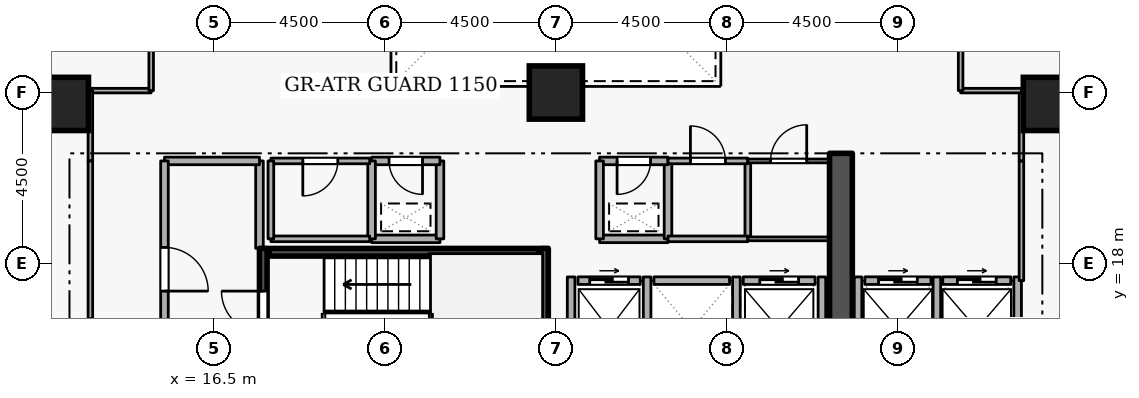
"""IFC4 building model, lengths in metres.
Left out: names, types, materials, properties, quantities, classifications, styles, units other than length and angle.
Written with IfcOpenShell. Run it as: python <this file> out.ifc"""

import sys

from ifc_helpers import new_model, si_unit, direction, frame, frame_2d, origin, origin_2d, place, context, subcontext, project, spatial, rectangle, extrude, element, fill, save


model = new_model("IFC4")
c1 = context("Model", 3, precision=1e-05, world=origin(), true_north=direction((0.0, 1.0)))
c2 = subcontext(c1, "Body", "Model", "MODEL_VIEW")
j1 = project(units=[si_unit("LENGTHUNIT", "METRE"), si_unit("PLANEANGLEUNIT", "RADIAN")], contexts=[c1])
p1 = place(None, origin())
s1 = spatial("IfcSite", under=j1, at=p1, CompositionType="ELEMENT")
p2 = place(p1, origin())
s2 = spatial("IfcBuilding", under=s1, at=p2, CompositionType="ELEMENT")
p3 = place(p2, frame((0.0, 0.0, 35.1)))
s3 = spatial("IfcBuildingStorey", under=s2, at=p3, CompositionType="ELEMENT", Elevation=35.1)
p4 = place(p3, frame((33.0, 15.2, 0.0), z_axis=(0.0, 0.0, 1.0), x_axis=(0.0, 1.0, 0.0)))
e1 = element("IfcWall", 1, at=p4, inside=s3, PredefinedType="SHEAR", context=c2, shape_type="SweptSolid", body=[
    extrude(rectangle(XDim=5.7, YDim=0.6, at=frame_2d((2.85, 0.0))), origin(), (0.0, 0.0, 1.0), 3.6),
])
for number, where, z_axis, x_axis in (
    (2, (12.5, 22.2, 0.0), (0.0, 0.0, 1.0), (1.0, 0.0, 0.0)),
    (3, (38.5, 22.2, 0.0), (0.0, 0.0, 1.0), (1.0, 0.0, 0.0)),
    (4, (25.5, 22.5, 0.0), (0.0, 0.0, 1.0), (1.0, 0.0, 0.0)),
):
    element("IfcColumn", number, at=place(p3, frame(where, z_axis=z_axis, x_axis=x_axis)), inside=s3, PredefinedType="COLUMN", context=c2, shape_type="SweptSolid", body=[
        extrude(rectangle(XDim=1.4, YDim=1.4, at=origin_2d()), origin(), (0.0, 0.0, 1.0), 3.6),
    ])
p5 = place(p3, frame((26.08, 17.55, 0.0), z_axis=(0.0, 0.0, 1.0), x_axis=(1.0, 0.0, 0.0)))
e5 = element("IfcWall", 5, at=p5, inside=s3, PredefinedType="STANDARD", context=c2, shape_type="SweptSolid", body=[
    extrude(rectangle(XDim=1.64, YDim=0.2, at=frame_2d((0.82, 0.0))), origin(), (0.0, 0.0, 1.0), 3.34),
])
p6 = place(p5, frame((0.31, 0.0, 0.0)))
e6 = element("IfcOpeningElement", 6, at=p6, cuts=e5, PredefinedType="OPENING", context=c2, shape_type="SweptSolid", body=[
    extrude(rectangle(XDim=1.02, YDim=2.06, at=frame_2d((0.51, 1.03))), frame((0.0, 0.11, 0.0), z_axis=(0.0, -1.0, 0.0), x_axis=(1.0, 0.0, 0.0)), (0.0, 0.0, 1.0), 0.22),
])
p7 = place(p3, frame((28.08, 17.55, 0.0), z_axis=(0.0, 0.0, 1.0), x_axis=(1.0, 0.0, 0.0)))
e7 = element("IfcWall", 7, at=p7, inside=s3, PredefinedType="STANDARD", context=c2, shape_type="SweptSolid", body=[
    extrude(rectangle(XDim=1.99, YDim=0.2, at=frame_2d((0.995, 0.0))), origin(), (0.0, 0.0, 1.0), 3.34),
])
p8 = place(p3, frame((30.43, 17.55, 0.0), z_axis=(0.0, 0.0, 1.0), x_axis=(1.0, 0.0, 0.0)))
e8 = element("IfcWall", 8, at=p8, inside=s3, PredefinedType="STANDARD", context=c2, shape_type="SweptSolid", body=[
    extrude(rectangle(XDim=1.89, YDim=0.2, at=frame_2d((0.945, 0.0))), origin(), (0.0, 0.0, 1.0), 3.34),
])
p9 = place(p8, frame((0.435, 0.0, 0.0)))
e9 = element("IfcOpeningElement", 9, at=p9, cuts=e8, PredefinedType="OPENING", context=c2, shape_type="SweptSolid", body=[
    extrude(rectangle(XDim=1.02, YDim=2.06, at=frame_2d((0.51, 1.03))), frame((0.0, 0.11, 0.0), z_axis=(0.0, -1.0, 0.0), x_axis=(1.0, 0.0, 0.0)), (0.0, 0.0, 1.0), 0.22),
])
p10 = place(p3, frame((33.63, 17.55, 0.0), z_axis=(0.0, 0.0, 1.0), x_axis=(1.0, 0.0, 0.0)))
e10 = element("IfcWall", 10, at=p10, inside=s3, PredefinedType="STANDARD", context=c2, shape_type="SweptSolid", body=[
    extrude(rectangle(XDim=1.74, YDim=0.2, at=frame_2d((0.87, 0.0))), origin(), (0.0, 0.0, 1.0), 3.34),
])
p11 = place(p10, frame((0.36, 0.0, 0.0)))
e11 = element("IfcOpeningElement", 11, at=p11, cuts=e10, PredefinedType="OPENING", context=c2, shape_type="SweptSolid", body=[
    extrude(rectangle(XDim=1.02, YDim=2.06, at=frame_2d((0.51, 1.03))), frame((0.0, 0.11, 0.0), z_axis=(0.0, -1.0, 0.0), x_axis=(1.0, 0.0, 0.0)), (0.0, 0.0, 1.0), 0.22),
])
p12 = place(p3, frame((35.68, 17.55, 0.0), z_axis=(0.0, 0.0, 1.0), x_axis=(1.0, 0.0, 0.0)))
e12 = element("IfcWall", 12, at=p12, inside=s3, PredefinedType="STANDARD", context=c2, shape_type="SweptSolid", body=[
    extrude(rectangle(XDim=1.79, YDim=0.2, at=frame_2d((0.895, 0.0))), origin(), (0.0, 0.0, 1.0), 3.34),
])
p13 = place(p12, frame((0.385, 0.0, 0.0)))
e13 = element("IfcOpeningElement", 13, at=p13, cuts=e12, PredefinedType="OPENING", context=c2, shape_type="SweptSolid", body=[
    extrude(rectangle(XDim=1.02, YDim=2.06, at=frame_2d((0.51, 1.03))), frame((0.0, 0.11, 0.0), z_axis=(0.0, -1.0, 0.0), x_axis=(1.0, 0.0, 0.0)), (0.0, 0.0, 1.0), 0.22),
])
for number, where, z_axis, x_axis in (
    (14, (27.9, 15.212, 0.0), (0.0, 0.0, 1.0), (0.0, 1.0, 0.0)),
    (15, (25.9, 15.212, 0.0), (0.0, 0.0, 1.0), (0.0, 1.0, 0.0)),
    (16, (30.25, 15.212, 0.0), (0.0, 0.0, 1.0), (0.0, 1.0, 0.0)),
    (17, (32.5, 15.212, 0.0), (0.0, 0.0, 1.0), (0.0, 1.0, 0.0)),
):
    element("IfcWall", number, at=place(p3, frame(where, z_axis=z_axis, x_axis=x_axis)), inside=s3, PredefinedType="STANDARD", context=c2, shape_type="SweptSolid", body=[
        extrude(rectangle(XDim=2.436, YDim=0.2, at=frame_2d((1.218, 0.0))), origin(), (0.0, 0.0, 1.0), 3.34),
    ])
for number, where, z_axis, x_axis in (
    (18, (35.525, 15.012, 0.0), (0.0, 0.0, 1.0), (0.0, 1.0, 0.0)),
    (19, (33.45, 15.012, 0.0), (0.0, 0.0, 1.0), (0.0, 1.0, 0.0)),
    (20, (37.65, 15.012, 0.0), (0.0, 0.0, 1.0), (0.0, 1.0, 0.0)),
):
    element("IfcWall", number, at=place(p3, frame(where, z_axis=z_axis, x_axis=x_axis)), inside=s3, PredefinedType="STANDARD", context=c2, shape_type="SweptSolid", body=[
        extrude(rectangle(XDim=2.636, YDim=0.2, at=frame_2d((1.318, 0.0))), origin(), (0.0, 0.0, 1.0), 3.34),
    ])
p14 = place(p3, frame((17.8, 15.05, 0.0), z_axis=(0.0, 0.0, 1.0), x_axis=(0.0, 1.0, 0.0)))
e21 = element("IfcWall", 21, at=p14, inside=s3, PredefinedType="SHEAR", context=c2, shape_type="SweptSolid", body=[
    extrude(rectangle(XDim=3.35, YDim=0.2, at=frame_2d((1.675, 0.0))), origin(), (0.0, 0.0, 1.0), 3.6),
])
p15 = place(p14, frame((1.125, 0.0, 0.0)))
e22 = element("IfcOpeningElement", 22, at=p15, cuts=e21, PredefinedType="OPENING", context=c2, shape_type="SweptSolid", body=[
    extrude(rectangle(XDim=1.1, YDim=2.1, at=frame_2d((0.55, 1.05))), frame((0.0, 0.11, 0.0), z_axis=(0.0, -1.0, 0.0), x_axis=(1.0, 0.0, 0.0)), (0.0, 0.0, 1.0), 0.22),
])
p16 = place(p3, frame((25.2, 18.4, 0.0), z_axis=(0.0, 0.0, 1.0), x_axis=(0.0, -1.0, 0.0)))
e23 = element("IfcWall", 23, at=p16, inside=s3, PredefinedType="SHEAR", context=c2, shape_type="SweptSolid", body=[
    extrude(rectangle(XDim=3.35, YDim=0.2, at=frame_2d((1.675, 0.0))), origin(), (0.0, 0.0, 1.0), 3.6),
])
p17 = place(p3, frame((25.05, 18.297, 0.0), z_axis=(0.0, 0.0, 1.0), x_axis=(-1.0, 0.0, 0.0)))
e24 = element("IfcWall", 24, at=p17, inside=s3, PredefinedType="SHEAR", context=c2, shape_type="SweptSolid", body=[
    extrude(rectangle(XDim=7.1, YDim=0.2, at=frame_2d((3.55, 0.0))), origin(), (0.0, 0.0, 1.0), 3.6),
])
p18 = place(p3, frame((17.7, 18.4, 0.0), z_axis=(0.0, 0.0, 1.0), x_axis=(0.0, 1.0, 0.0)))
e25 = element("IfcWall", 25, at=p18, inside=s3, PredefinedType="STANDARD", context=c2, shape_type="SweptSolid", body=[
    extrude(rectangle(XDim=2.3, YDim=0.2, at=frame_2d((1.15, 0.0))), origin(), (0.0, 0.0, 1.0), 2.545),
])
p19 = place(p3, frame((17.7, 20.7, 0.0), z_axis=(0.0, 0.0, 1.0), x_axis=(-1.0, 0.0, 0.0)))
e26 = element("IfcWall", 26, at=p19, inside=s3, PredefinedType="STANDARD", context=c2, shape_type="SweptSolid", body=[
    extrude(rectangle(XDim=2.5, YDim=0.2, at=frame_2d((1.25, 0.0))), origin(), (0.0, 0.0, 1.0), 3.34),
])
p20 = place(p3, frame((15.2, 20.7, 0.0), z_axis=(0.0, 0.0, 1.0), x_axis=(0.0, -1.0, 0.0)))
e27 = element("IfcWall", 27, at=p20, inside=s3, PredefinedType="STANDARD", context=c2, shape_type="SweptSolid", body=[
    extrude(rectangle(XDim=5.7, YDim=0.2, at=frame_2d((2.85, 0.0))), origin(), (0.0, 0.0, 1.0), 3.34),
])
p21 = place(p20, frame((2.275, 0.0, 0.0)))
e28 = element("IfcOpeningElement", 28, at=p21, cuts=e27, PredefinedType="OPENING", context=c2, shape_type="SweptSolid", body=[
    extrude(rectangle(XDim=1.15, YDim=2.1, at=frame_2d((0.575, 1.05))), frame((0.0, 0.11, 0.0), z_axis=(0.0, -1.0, 0.0), x_axis=(1.0, 0.0, 0.0)), (0.0, 0.0, 1.0), 0.22),
])
p22 = place(p3, frame((26.65, 18.65, 0.0), z_axis=(0.0, 0.0, 1.0), x_axis=(1.0, 0.0, 0.0)))
e29 = element("IfcWall", 29, at=p22, inside=s3, PredefinedType="STANDARD", context=c2, shape_type="SweptSolid", body=[
    extrude(rectangle(XDim=1.8, YDim=0.2, at=frame_2d((0.9, 0.0))), origin(), (0.0, 0.0, 1.0), 3.34),
])
p23 = place(p3, frame((28.45, 18.65, 0.0), z_axis=(0.0, 0.0, 1.0), x_axis=(0.0, 1.0, 0.0)))
e30 = element("IfcWall", 30, at=p23, inside=s3, PredefinedType="STANDARD", context=c2, shape_type="SweptSolid", body=[
    extrude(rectangle(XDim=2.05, YDim=0.2, at=frame_2d((1.025, 0.0))), origin(), (0.0, 0.0, 1.0), 3.34),
])
p24 = place(p3, frame((28.45, 20.7, 0.0), z_axis=(0.0, 0.0, 1.0), x_axis=(-1.0, 0.0, 0.0)))
e31 = element("IfcWall", 31, at=p24, inside=s3, PredefinedType="STANDARD", context=c2, shape_type="SweptSolid", body=[
    extrude(rectangle(XDim=1.8, YDim=0.2, at=frame_2d((0.9, 0.0))), origin(), (0.0, 0.0, 1.0), 3.34),
])
p25 = place(p24, frame((0.46, 0.0, 0.0)))
e32 = element("IfcOpeningElement", 32, at=p25, cuts=e31, PredefinedType="OPENING", context=c2, shape_type="SweptSolid", body=[
    extrude(rectangle(XDim=0.88, YDim=2.04, at=frame_2d((0.44, 1.02))), frame((0.0, 0.11, 0.0), z_axis=(0.0, -1.0, 0.0), x_axis=(1.0, 0.0, 0.0)), (0.0, 0.0, 1.0), 0.22),
])
p26 = place(p3, frame((26.65, 20.7, 0.0), z_axis=(0.0, 0.0, 1.0), x_axis=(0.0, -1.0, 0.0)))
e33 = element("IfcWall", 33, at=p26, inside=s3, PredefinedType="STANDARD", context=c2, shape_type="SweptSolid", body=[
    extrude(rectangle(XDim=2.05, YDim=0.2, at=frame_2d((1.025, 0.0))), origin(), (0.0, 0.0, 1.0), 3.34),
])
p27 = place(p3, frame((20.65, 18.65, 0.0), z_axis=(0.0, 0.0, 1.0), x_axis=(1.0, 0.0, 0.0)))
e34 = element("IfcWall", 34, at=p27, inside=s3, PredefinedType="STANDARD", context=c2, shape_type="SweptSolid", body=[
    extrude(rectangle(XDim=1.8, YDim=0.2, at=frame_2d((0.9, 0.0))), origin(), (0.0, 0.0, 1.0), 3.34),
])
p28 = place(p3, frame((22.45, 18.65, 0.0), z_axis=(0.0, 0.0, 1.0), x_axis=(0.0, 1.0, 0.0)))
e35 = element("IfcWall", 35, at=p28, inside=s3, PredefinedType="STANDARD", context=c2, shape_type="SweptSolid", body=[
    extrude(rectangle(XDim=2.05, YDim=0.2, at=frame_2d((1.025, 0.0))), origin(), (0.0, 0.0, 1.0), 3.34),
])
p29 = place(p3, frame((22.45, 20.7, 0.0), z_axis=(0.0, 0.0, 1.0), x_axis=(-1.0, 0.0, 0.0)))
e36 = element("IfcWall", 36, at=p29, inside=s3, PredefinedType="STANDARD", context=c2, shape_type="SweptSolid", body=[
    extrude(rectangle(XDim=1.8, YDim=0.2, at=frame_2d((0.9, 0.0))), origin(), (0.0, 0.0, 1.0), 3.34),
])
p30 = place(p29, frame((0.46, 0.0, 0.0)))
e37 = element("IfcOpeningElement", 37, at=p30, cuts=e36, PredefinedType="OPENING", context=c2, shape_type="SweptSolid", body=[
    extrude(rectangle(XDim=0.88, YDim=2.04, at=frame_2d((0.44, 1.02))), frame((0.0, 0.11, 0.0), z_axis=(0.0, -1.0, 0.0), x_axis=(1.0, 0.0, 0.0)), (0.0, 0.0, 1.0), 0.22),
])
p31 = place(p3, frame((20.65, 20.7, 0.0), z_axis=(0.0, 0.0, 1.0), x_axis=(0.0, -1.0, 0.0)))
e38 = element("IfcWall", 38, at=p31, inside=s3, PredefinedType="STANDARD", context=c2, shape_type="SweptSolid", body=[
    extrude(rectangle(XDim=2.05, YDim=0.2, at=frame_2d((1.025, 0.0))), origin(), (0.0, 0.0, 1.0), 3.34),
])
p32 = place(p3, frame((18.0, 18.65, 0.0), z_axis=(0.0, 0.0, 1.0), x_axis=(1.0, 0.0, 0.0)))
e39 = element("IfcWall", 39, at=p32, inside=s3, PredefinedType="PARTITIONING", context=c2, shape_type="SweptSolid", body=[
    extrude(rectangle(XDim=2.6, YDim=0.15, at=frame_2d((1.3, 0.0))), origin(), (0.0, 0.0, 1.0), 3.34),
])
p33 = place(p3, frame((20.6, 20.7, 0.0), z_axis=(0.0, 0.0, 1.0), x_axis=(-1.0, 0.0, 0.0)))
e40 = element("IfcWall", 40, at=p33, inside=s3, PredefinedType="PARTITIONING", context=c2, shape_type="SweptSolid", body=[
    extrude(rectangle(XDim=2.6, YDim=0.15, at=frame_2d((1.3, 0.0))), origin(), (0.0, 0.0, 1.0), 3.34),
])
p34 = place(p33, frame((0.84, 0.0, 0.0)))
e41 = element("IfcOpeningElement", 41, at=p34, cuts=e40, PredefinedType="OPENING", context=c2, shape_type="SweptSolid", body=[
    extrude(rectangle(XDim=0.92, YDim=2.08, at=frame_2d((0.46, 1.04))), frame((0.0, 0.085, 0.0), z_axis=(0.0, -1.0, 0.0), x_axis=(1.0, 0.0, 0.0)), (0.0, 0.0, 1.0), 0.17),
])
p35 = place(p3, frame((18.0, 20.7, 0.0), z_axis=(0.0, 0.0, 1.0), x_axis=(0.0, -1.0, 0.0)))
e42 = element("IfcWall", 42, at=p35, inside=s3, PredefinedType="PARTITIONING", context=c2, shape_type="SweptSolid", body=[
    extrude(rectangle(XDim=2.05, YDim=0.15, at=frame_2d((1.025, 0.0))), origin(), (0.0, 0.0, 1.0), 2.545),
])
p36 = place(p3, frame((30.55, 20.7, 0.0), z_axis=(0.0, 0.0, 1.0), x_axis=(0.0, -1.0, 0.0)))
e43 = element("IfcWall", 43, at=p36, inside=s3, PredefinedType="PARTITIONING", context=c2, shape_type="SweptSolid", body=[
    extrude(rectangle(XDim=2.05, YDim=0.15, at=frame_2d((1.025, 0.0))), origin(), (0.0, 0.0, 1.0), 3.34),
])
p37 = place(p3, frame((30.55, 18.65, 0.0), z_axis=(0.0, 0.0, 1.0), x_axis=(-1.0, 0.0, 0.0)))
e44 = element("IfcWall", 44, at=p37, inside=s3, PredefinedType="PARTITIONING", context=c2, shape_type="SweptSolid", body=[
    extrude(rectangle(XDim=2.1, YDim=0.15, at=frame_2d((1.05, 0.0))), origin(), (0.0, 0.0, 1.0), 3.34),
])
p38 = place(p3, frame((28.45, 20.7, 0.0), z_axis=(0.0, 0.0, 1.0), x_axis=(1.0, 0.0, 0.0)))
e45 = element("IfcWall", 45, at=p38, inside=s3, PredefinedType="PARTITIONING", context=c2, shape_type="SweptSolid", body=[
    extrude(rectangle(XDim=2.1, YDim=0.15, at=frame_2d((1.05, 0.0))), origin(), (0.0, 0.0, 1.0), 3.34),
])
p39 = place(p38, frame((0.59, 0.0, 0.0)))
e46 = element("IfcOpeningElement", 46, at=p39, cuts=e45, PredefinedType="OPENING", context=c2, shape_type="SweptSolid", body=[
    extrude(rectangle(XDim=0.92, YDim=2.08, at=frame_2d((0.46, 1.04))), frame((0.0, 0.085, 0.0), z_axis=(0.0, -1.0, 0.0), x_axis=(1.0, 0.0, 0.0)), (0.0, 0.0, 1.0), 0.17),
])
p40 = place(p3, frame((32.7, 18.65, 0.0), z_axis=(0.0, 0.0, 1.0), x_axis=(-1.0, 0.0, 0.0)))
e47 = element("IfcWall", 47, at=p40, inside=s3, PredefinedType="PARTITIONING", context=c2, shape_type="SweptSolid", body=[
    extrude(rectangle(XDim=2.15, YDim=0.1, at=frame_2d((1.075, 0.0))), origin(), (0.0, 0.0, 1.0), 3.34),
])
p41 = place(p3, frame((30.55, 20.7, 0.0), z_axis=(0.0, 0.0, 1.0), x_axis=(1.0, 0.0, 0.0)))
e48 = element("IfcWall", 48, at=p41, inside=s3, PredefinedType="PARTITIONING", context=c2, shape_type="SweptSolid", body=[
    extrude(rectangle(XDim=2.15, YDim=0.1, at=frame_2d((1.075, 0.0))), origin(), (0.0, 0.0, 1.0), 3.34),
])
p42 = place(p41, frame((0.6, 0.0, 0.0)))
e49 = element("IfcOpeningElement", 49, at=p42, cuts=e48, PredefinedType="OPENING", context=c2, shape_type="SweptSolid", body=[
    extrude(rectangle(XDim=0.95, YDim=2.1, at=frame_2d((0.475, 1.05))), frame((0.0, 0.06, 0.0), z_axis=(0.0, -1.0, 0.0), x_axis=(1.0, 0.0, 0.0)), (0.0, 0.0, 1.0), 0.12),
])
p43 = place(p3, frame((14.85, 22.55, 0.0), z_axis=(0.0, 0.0, 1.0), x_axis=(-1.0, 0.0, 0.0)))
e50 = element("IfcWall", 50, at=p43, inside=s3, PredefinedType="PARTITIONING", context=c2, shape_type="SweptSolid", body=[
    extrude(rectangle(XDim=1.6, YDim=0.12, at=frame_2d((0.8, 0.0))), origin(), (0.0, 0.0, 1.0), 3.34),
])
p44 = place(p3, frame((13.25, 22.55, 0.0), z_axis=(0.0, 0.0, 1.0), x_axis=(0.0, -1.0, 0.0)))
e51 = element("IfcWall", 51, at=p44, inside=s3, PredefinedType="PARTITIONING", context=c2, shape_type="SweptSolid", body=[
    extrude(rectangle(XDim=1.85, YDim=0.12, at=frame_2d((0.925, 0.0))), origin(), (0.0, 0.0, 1.0), 3.34),
])
p45 = place(p3, frame((13.25, 20.7, 0.0), z_axis=(0.0, 0.0, 1.0), x_axis=(0.0, -1.0, 0.0)))
e52 = element("IfcWall", 52, at=p45, inside=s3, PredefinedType="PARTITIONING", context=c2, shape_type="SweptSolid", body=[
    extrude(rectangle(XDim=9.35, YDim=0.12, at=frame_2d((4.675, 0.0))), origin(), (0.0, 0.0, 1.0), 3.34),
])
p46 = place(p45, frame((4.15, 0.0, 0.0)))
e53 = element("IfcOpeningElement", 53, at=p46, cuts=e52, PredefinedType="OPENING", context=c2, shape_type="SweptSolid", body=[
    extrude(rectangle(XDim=1.05, YDim=2.1, at=frame_2d((0.525, 1.05))), frame((0.0, 0.07, 0.0), z_axis=(0.0, -1.0, 0.0), x_axis=(1.0, 0.0, 0.0)), (0.0, 0.0, 1.0), 0.14),
])
p47 = place(p3, frame((14.85, 27.0, 0.0), z_axis=(0.0, 0.0, 1.0), x_axis=(0.0, -1.0, 0.0)))
e54 = element("IfcWall", 54, at=p47, inside=s3, PredefinedType="PARTITIONING", context=c2, shape_type="SweptSolid", body=[
    extrude(rectangle(XDim=4.45, YDim=0.12, at=frame_2d((2.225, 0.0))), origin(), (0.0, 0.0, 1.0), 3.34),
])
p48 = place(p3, frame((37.75, 17.55, 0.0), z_axis=(0.0, 0.0, 1.0), x_axis=(0.0, 1.0, 0.0)))
e55 = element("IfcWall", 55, at=p48, inside=s3, PredefinedType="PARTITIONING", context=c2, shape_type="SweptSolid", body=[
    extrude(rectangle(XDim=3.15, YDim=0.12, at=frame_2d((1.575, 0.0))), origin(), (0.0, 0.0, 1.0), 3.34),
])
p49 = place(p3, frame((37.75, 20.7, 0.0), z_axis=(0.0, 0.0, 1.0), x_axis=(0.0, 1.0, 0.0)))
e56 = element("IfcWall", 56, at=p49, inside=s3, PredefinedType="PARTITIONING", context=c2, shape_type="SweptSolid", body=[
    extrude(rectangle(XDim=1.85, YDim=0.12, at=frame_2d((0.925, 0.0))), origin(), (0.0, 0.0, 1.0), 3.34),
])
p50 = place(p3, frame((37.75, 22.55, 0.0), z_axis=(0.0, 0.0, 1.0), x_axis=(-1.0, 0.0, 0.0)))
e57 = element("IfcWall", 57, at=p50, inside=s3, PredefinedType="PARTITIONING", context=c2, shape_type="SweptSolid", body=[
    extrude(rectangle(XDim=1.6, YDim=0.12, at=frame_2d((0.8, 0.0))), origin(), (0.0, 0.0, 1.0), 3.34),
])
p51 = place(p3, frame((36.15, 22.55, 0.0), z_axis=(0.0, 0.0, 1.0), x_axis=(0.0, 1.0, 0.0)))
e58 = element("IfcWall", 58, at=p51, inside=s3, PredefinedType="PARTITIONING", context=c2, shape_type="SweptSolid", body=[
    extrude(rectangle(XDim=4.45, YDim=0.12, at=frame_2d((2.225, 0.0))), origin(), (0.0, 0.0, 1.0), 3.34),
])
p52 = place(p51, frame((1.7, 0.0, 0.0)))
e59 = element("IfcOpeningElement", 59, at=p52, cuts=e58, PredefinedType="OPENING", context=c2, shape_type="SweptSolid", body=[
    extrude(rectangle(XDim=1.05, YDim=2.1, at=frame_2d((0.525, 1.05))), frame((0.0, 0.07, 0.0), z_axis=(0.0, -1.0, 0.0), x_axis=(1.0, 0.0, 0.0)), (0.0, 0.0, 1.0), 0.14),
])
p53 = place(p6, origin())
e60 = element("IfcDoor", 60, at=p53, inside=s3, OperationType="SLIDING_TO_LEFT", PredefinedType="DOOR", context=c2, shape_type="SweptSolid", body=[
    extrude(rectangle(XDim=1.02, YDim=2.06, at=frame_2d((0.51, 1.03))), frame((0.0, 0.025, 0.0), z_axis=(0.0, -1.0, 0.0), x_axis=(1.0, 0.0, 0.0)), (0.0, 0.0, 1.0), 0.05),
])
fill(e6, e60)
p54 = place(p9, origin())
e61 = element("IfcDoor", 61, at=p54, inside=s3, OperationType="SLIDING_TO_LEFT", PredefinedType="DOOR", context=c2, shape_type="SweptSolid", body=[
    extrude(rectangle(XDim=1.02, YDim=2.06, at=frame_2d((0.51, 1.03))), frame((0.0, 0.025, 0.0), z_axis=(0.0, -1.0, 0.0), x_axis=(1.0, 0.0, 0.0)), (0.0, 0.0, 1.0), 0.05),
])
fill(e9, e61)
p55 = place(p11, origin())
e62 = element("IfcDoor", 62, at=p55, inside=s3, OperationType="SLIDING_TO_LEFT", PredefinedType="DOOR", context=c2, shape_type="SweptSolid", body=[
    extrude(rectangle(XDim=1.02, YDim=2.06, at=frame_2d((0.51, 1.03))), frame((0.0, 0.025, 0.0), z_axis=(0.0, -1.0, 0.0), x_axis=(1.0, 0.0, 0.0)), (0.0, 0.0, 1.0), 0.05),
])
fill(e11, e62)
p56 = place(p13, origin())
e63 = element("IfcDoor", 63, at=p56, inside=s3, OperationType="SLIDING_TO_LEFT", PredefinedType="DOOR", context=c2, shape_type="SweptSolid", body=[
    extrude(rectangle(XDim=1.02, YDim=2.06, at=frame_2d((0.51, 1.03))), frame((0.0, 0.025, 0.0), z_axis=(0.0, -1.0, 0.0), x_axis=(1.0, 0.0, 0.0)), (0.0, 0.0, 1.0), 0.05),
])
fill(e13, e63)
p57 = place(p15, origin())
e64 = element("IfcDoor", 64, at=p57, inside=s3, OperationType="SINGLE_SWING_RIGHT", PredefinedType="DOOR", context=c2, shape_type="SweptSolid", body=[
    extrude(rectangle(XDim=1.1, YDim=2.1, at=frame_2d((0.55, 1.05))), frame((0.0, 0.025, 0.0), z_axis=(0.0, -1.0, 0.0), x_axis=(1.0, 0.0, 0.0)), (0.0, 0.0, 1.0), 0.05),
])
fill(e22, e64)
p58 = place(p21, origin())
e65 = element("IfcDoor", 65, at=p58, inside=s3, OperationType="SINGLE_SWING_RIGHT", PredefinedType="DOOR", context=c2, shape_type="SweptSolid", body=[
    extrude(rectangle(XDim=1.15, YDim=2.1, at=frame_2d((0.575, 1.05))), frame((0.0, 0.025, 0.0), z_axis=(0.0, -1.0, 0.0), x_axis=(1.0, 0.0, 0.0)), (0.0, 0.0, 1.0), 0.05),
])
fill(e28, e65)
p59 = place(p25, origin())
e66 = element("IfcDoor", 66, at=p59, inside=s3, OperationType="SINGLE_SWING_RIGHT", PredefinedType="DOOR", context=c2, shape_type="SweptSolid", body=[
    extrude(rectangle(XDim=0.88, YDim=2.04, at=frame_2d((0.44, 1.02))), frame((0.0, 0.025, 0.0), z_axis=(0.0, -1.0, 0.0), x_axis=(1.0, 0.0, 0.0)), (0.0, 0.0, 1.0), 0.05),
])
fill(e32, e66)
p60 = place(p30, origin())
e67 = element("IfcDoor", 67, at=p60, inside=s3, OperationType="SINGLE_SWING_LEFT", PredefinedType="DOOR", context=c2, shape_type="SweptSolid", body=[
    extrude(rectangle(XDim=0.88, YDim=2.04, at=frame_2d((0.44, 1.02))), frame((0.0, 0.025, 0.0), z_axis=(0.0, -1.0, 0.0), x_axis=(1.0, 0.0, 0.0)), (0.0, 0.0, 1.0), 0.05),
])
fill(e37, e67)
p61 = place(p34, origin())
e68 = element("IfcDoor", 68, at=p61, inside=s3, OperationType="SINGLE_SWING_RIGHT", PredefinedType="DOOR", context=c2, shape_type="SweptSolid", body=[
    extrude(rectangle(XDim=0.92, YDim=2.08, at=frame_2d((0.46, 1.04))), frame((0.0, 0.025, 0.0), z_axis=(0.0, -1.0, 0.0), x_axis=(1.0, 0.0, 0.0)), (0.0, 0.0, 1.0), 0.05),
])
fill(e41, e68)
p62 = place(p39, origin())
e69 = element("IfcDoor", 69, at=p62, inside=s3, OperationType="SINGLE_SWING_LEFT", PredefinedType="DOOR", context=c2, shape_type="SweptSolid", body=[
    extrude(rectangle(XDim=0.92, YDim=2.08, at=frame_2d((0.46, 1.04))), frame((0.0, 0.025, 0.0), z_axis=(0.0, -1.0, 0.0), x_axis=(1.0, 0.0, 0.0)), (0.0, 0.0, 1.0), 0.05),
])
fill(e46, e69)
p63 = place(p42, origin())
e70 = element("IfcDoor", 70, at=p63, inside=s3, OperationType="SINGLE_SWING_RIGHT", PredefinedType="DOOR", context=c2, shape_type="SweptSolid", body=[
    extrude(rectangle(XDim=0.95, YDim=2.1, at=frame_2d((0.475, 1.05))), frame((0.0, 0.025, 0.0), z_axis=(0.0, -1.0, 0.0), x_axis=(1.0, 0.0, 0.0)), (0.0, 0.0, 1.0), 0.05),
])
fill(e49, e70)
p64 = place(p46, origin())
e71 = element("IfcDoor", 71, at=p64, inside=s3, OperationType="SINGLE_SWING_RIGHT", PredefinedType="DOOR", context=c2, shape_type="SweptSolid", body=[
    extrude(rectangle(XDim=1.05, YDim=2.1, at=frame_2d((0.525, 1.05))), frame((0.0, 0.025, 0.0), z_axis=(0.0, -1.0, 0.0), x_axis=(1.0, 0.0, 0.0)), (0.0, 0.0, 1.0), 0.05),
])
fill(e53, e71)
save(model, sys.argv[1])
